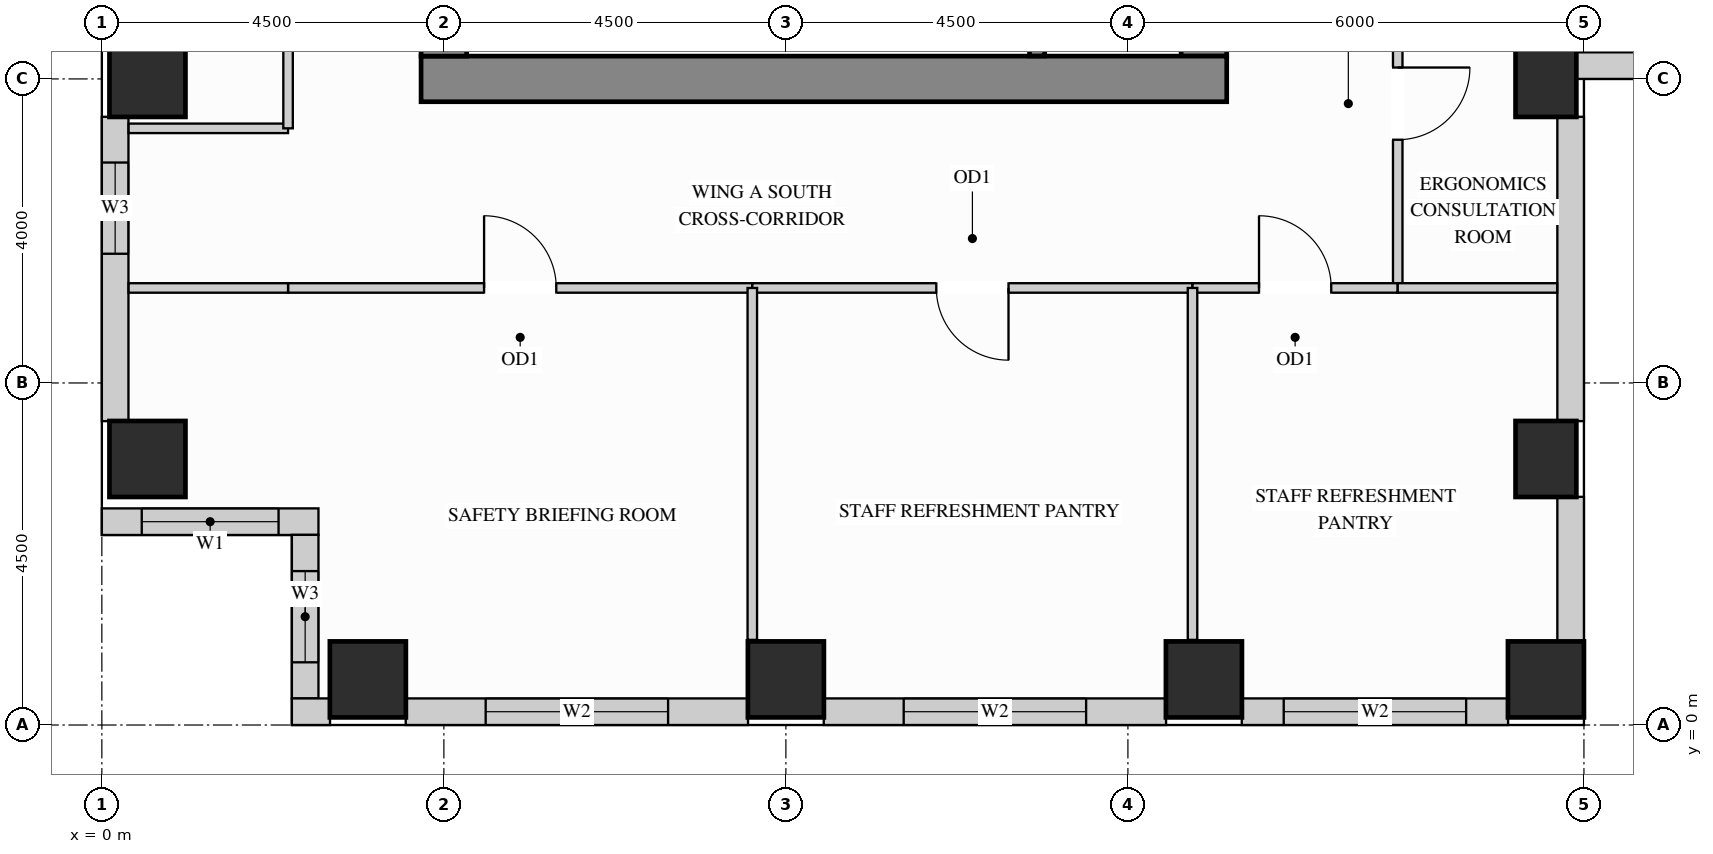
"""IFC4 building model, lengths in metres.
Left out: names, types, materials, properties, quantities, classifications, styles, units other than length and angle.
Written with IfcOpenShell. Run it as: python <this file> out.ifc"""

import sys

from ifc_helpers import new_model, si_unit, direction, frame, frame_2d, origin, origin_2d, place, context, subcontext, project, spatial, rectangle, extrude, source, transform, mapped, element, fill, save


model = new_model("IFC4")
c1 = context("Model", 3, precision=1e-05, world=origin(), true_north=direction((0.0, 1.0)))
c2 = subcontext(c1, "Body", "Model", "MODEL_VIEW")
j1 = project(units=[si_unit("LENGTHUNIT", "METRE"), si_unit("PLANEANGLEUNIT", "RADIAN")], contexts=[c1])
p1 = place(None, origin())
s1 = spatial("IfcSite", under=j1, at=p1, CompositionType="ELEMENT")
p2 = place(p1, origin())
s2 = spatial("IfcBuilding", under=s1, at=p2, CompositionType="ELEMENT")
p3 = place(p2, frame((0.0, 0.0, 157.5)))
s3 = spatial("IfcBuildingStorey", under=s2, at=p3, CompositionType="ELEMENT", Elevation=157.5)
m1 = source(origin(), c2, "Body", "SweptSolid", [
    extrude(rectangle(XDim=0.8, YDim=1.0, at=origin_2d()), origin(), (0.0, 0.0, 1.0), 3.4),
])
for number, where, z_axis, x_axis in (
    (1, (19.0, 3.5, 0.0), (0.0, 0.0, 1.0), (1.0, 0.0, 0.0)),
    (2, (19.0, 8.5, 0.0), (0.0, 0.0, 1.0), (1.0, 0.0, 0.0)),
):
    element("IfcColumn", number, at=place(p3, frame(where, z_axis=z_axis, x_axis=x_axis)), inside=s3, PredefinedType="COLUMN", context=c2, shape_type="MappedRepresentation", body=[
        mapped(m1, transform((0.0, 0.0, 0.0), x_axis=(1.0, 0.0, 0.0), y_axis=(0.0, 1.0, 0.0), z_axis=(0.0, 0.0, 1.0))),
    ])
m2 = source(origin(), c2, "Body", "SweptSolid", [
    extrude(rectangle(XDim=1.0, YDim=1.0, at=origin_2d()), origin(), (0.0, 0.0, 1.0), 3.4),
])
for number, where, z_axis, x_axis in (
    (3, (14.5, 0.6, 0.0), (0.0, 0.0, 1.0), (1.0, 0.0, 0.0)),
    (4, (19.0, 0.6, 0.0), (0.0, 0.0, 1.0), (1.0, 0.0, 0.0)),
    (5, (3.5, 0.6, 0.0), (0.0, 0.0, 1.0), (1.0, 0.0, 0.0)),
    (6, (9.0, 0.6, 0.0), (0.0, 0.0, 1.0), (1.0, 0.0, 0.0)),
    (7, (0.6, 3.5, 0.0), (0.0, 0.0, 1.0), (1.0, 0.0, 0.0)),
    (8, (0.6, 8.5, 0.0), (0.0, 0.0, 1.0), (1.0, 0.0, 0.0)),
):
    element("IfcColumn", number, at=place(p3, frame(where, z_axis=z_axis, x_axis=x_axis)), inside=s3, PredefinedType="COLUMN", context=c2, shape_type="MappedRepresentation", body=[
        mapped(m2, transform((0.0, 0.0, 0.0), x_axis=(1.0, 0.0, 0.0), y_axis=(0.0, 1.0, 0.0), z_axis=(0.0, 0.0, 1.0))),
    ])
m3 = source(origin(), c2, "Body", "SweptSolid", [
    extrude(rectangle(XDim=10.02, YDim=0.6, at=frame_2d((5.01, 0.0))), origin(), (0.0, 0.0, 1.0), 3.4),
])
p4 = place(p3, frame((14.5, 8.8, 0.0), z_axis=(0.0, 0.0, 1.0), x_axis=(0.0, 1.0, 0.0)))
e9 = element("IfcWall", 9, at=p4, inside=s3, PredefinedType="SHEAR", context=c2, shape_type="MappedRepresentation", body=[
    mapped(m3, transform((0.0, 0.0, 0.0), x_axis=(1.0, 0.0, 0.0), y_axis=(0.0, 1.0, 0.0), z_axis=(0.0, 0.0, 1.0))),
])
m4 = source(origin(), c2, "Body", "SweptSolid", [
    extrude(rectangle(XDim=10.6, YDim=0.6, at=frame_2d((5.3, 0.0))), origin(), (0.0, 0.0, 1.0), 3.4),
])
p5 = place(p3, frame((4.2, 8.5, 0.0), z_axis=(0.0, 0.0, 1.0), x_axis=(1.0, 0.0, 0.0)))
e10 = element("IfcWall", 10, at=p5, inside=s3, PredefinedType="SHEAR", context=c2, shape_type="MappedRepresentation", body=[
    mapped(m4, transform((0.0, 0.0, 0.0), x_axis=(1.0, 0.0, 0.0), y_axis=(0.0, 1.0, 0.0), z_axis=(0.0, 0.0, 1.0))),
])
m5 = source(origin(), c2, "Body", "SweptSolid", [
    extrude(rectangle(XDim=20.4, YDim=0.6, at=frame_2d((10.2, 0.0))), origin(), (0.0, 0.0, 1.0), 3.4),
])
p6 = place(p3, frame((4.5, 8.8, 0.0), z_axis=(0.0, 0.0, 1.0), x_axis=(0.0, 1.0, 0.0)))
e11 = element("IfcWall", 11, at=p6, inside=s3, PredefinedType="SHEAR", context=c2, shape_type="MappedRepresentation", body=[
    mapped(m5, transform((0.0, 0.0, 0.0), x_axis=(1.0, 0.0, 0.0), y_axis=(0.0, 1.0, 0.0), z_axis=(0.0, 0.0, 1.0))),
])
p7 = place(p3, frame((0.175, 8.002, 0.0), z_axis=(0.0, 0.0, 1.0), x_axis=(0.0, -1.0, 0.0)))
e12 = element("IfcWall", 12, at=p7, inside=s3, PredefinedType="SOLIDWALL", context=c2, shape_type="SweptSolid", body=[
    extrude(rectangle(XDim=4.004, YDim=0.35, at=frame_2d((2.002, 0.0))), origin(), (0.0, 0.0, 1.0), 2.612),
])
p8 = place(p7, frame((0.602, 0.0, 0.78)))
e13 = element("IfcOpeningElement", 13, at=p8, cuts=e12, PredefinedType="OPENING", context=c2, shape_type="SweptSolid", body=[
    extrude(rectangle(XDim=1.2, YDim=1.652, at=frame_2d((0.6, 0.826))), frame((0.0, 0.185, 0.0), z_axis=(0.0, -1.0, 0.0), x_axis=(1.0, 0.0, 0.0)), (0.0, 0.0, 1.0), 0.37),
])
p9 = place(p3, frame((0.0, 2.675, 0.0), z_axis=(0.0, 0.0, 1.0), x_axis=(1.0, 0.0, 0.0)))
e14 = element("IfcWall", 14, at=p9, inside=s3, PredefinedType="SOLIDWALL", context=c2, shape_type="SweptSolid", body=[
    extrude(rectangle(XDim=2.85, YDim=0.35, at=frame_2d((1.425, 0.0))), origin(), (0.0, 0.0, 1.0), 3.385),
])
p10 = place(p9, frame((0.525, 0.0, 0.78)))
e15 = element("IfcOpeningElement", 15, at=p10, cuts=e14, PredefinedType="OPENING", context=c2, shape_type="SweptSolid", body=[
    extrude(rectangle(XDim=1.8, YDim=2.1, at=frame_2d((0.9, 1.05))), frame((0.0, 0.185, 0.0), z_axis=(0.0, -1.0, 0.0), x_axis=(1.0, 0.0, 0.0)), (0.0, 0.0, 1.0), 0.37),
])
p11 = place(p3, frame((2.675, 2.502, 0.0), z_axis=(0.0, 0.0, 1.0), x_axis=(0.0, -1.0, 0.0)))
e16 = element("IfcWall", 16, at=p11, inside=s3, PredefinedType="SOLIDWALL", context=c2, shape_type="SweptSolid", body=[
    extrude(rectangle(XDim=2.154, YDim=0.35, at=frame_2d((1.077, 0.0))), origin(), (0.0, 0.0, 1.0), 3.385),
])
p12 = place(p11, frame((0.477, 0.0, 0.78)))
e17 = element("IfcOpeningElement", 17, at=p12, cuts=e16, PredefinedType="OPENING", context=c2, shape_type="SweptSolid", body=[
    extrude(rectangle(XDim=1.2, YDim=2.1, at=frame_2d((0.6, 1.05))), frame((0.0, 0.185, 0.0), z_axis=(0.0, -1.0, 0.0), x_axis=(1.0, 0.0, 0.0)), (0.0, 0.0, 1.0), 0.37),
])
m6 = source(origin(), c2, "Body", "SweptSolid", [
    extrude(rectangle(XDim=0.502, YDim=0.35, at=frame_2d((0.251, 0.0))), origin(), (0.0, 0.0, 1.0), 3.385),
])
p13 = place(p3, frame((2.5, 0.175, 0.0), z_axis=(0.0, 0.0, 1.0), x_axis=(1.0, 0.0, 0.0)))
e18 = element("IfcWall", 18, at=p13, inside=s3, PredefinedType="SOLIDWALL", context=c2, shape_type="MappedRepresentation", body=[
    mapped(m6, transform((0.0, 0.0, 0.0), x_axis=(1.0, 0.0, 0.0), y_axis=(0.0, 1.0, 0.0), z_axis=(0.0, 0.0, 1.0))),
])
p14 = place(p3, frame((3.998, 0.175, 0.0), z_axis=(0.0, 0.0, 1.0), x_axis=(1.0, 0.0, 0.0)))
e19 = element("IfcWall", 19, at=p14, inside=s3, PredefinedType="SOLIDWALL", context=c2, shape_type="SweptSolid", body=[
    extrude(rectangle(XDim=4.504, YDim=0.35, at=frame_2d((2.252, 0.0))), origin(), (0.0, 0.0, 1.0), 2.612),
])
p15 = place(p14, frame((1.052, 0.0, 0.78)))
e20 = element("IfcOpeningElement", 20, at=p15, cuts=e19, PredefinedType="OPENING", context=c2, shape_type="SweptSolid", body=[
    extrude(rectangle(XDim=2.4, YDim=1.652, at=frame_2d((1.2, 0.826))), frame((0.0, 0.185, 0.0), z_axis=(0.0, -1.0, 0.0), x_axis=(1.0, 0.0, 0.0)), (0.0, 0.0, 1.0), 0.37),
])
p16 = place(p3, frame((9.498, 0.175, 0.0), z_axis=(0.0, 0.0, 1.0), x_axis=(1.0, 0.0, 0.0)))
e21 = element("IfcWall", 21, at=p16, inside=s3, PredefinedType="SOLIDWALL", context=c2, shape_type="SweptSolid", body=[
    extrude(rectangle(XDim=4.504, YDim=0.35, at=frame_2d((2.252, 0.0))), origin(), (0.0, 0.0, 1.0), 2.612),
])
p17 = place(p16, frame((1.052, 0.0, 0.78)))
e22 = element("IfcOpeningElement", 22, at=p17, cuts=e21, PredefinedType="OPENING", context=c2, shape_type="SweptSolid", body=[
    extrude(rectangle(XDim=2.4, YDim=1.652, at=frame_2d((1.2, 0.826))), frame((0.0, 0.185, 0.0), z_axis=(0.0, -1.0, 0.0), x_axis=(1.0, 0.0, 0.0)), (0.0, 0.0, 1.0), 0.37),
])
p18 = place(p3, frame((14.998, 0.175, 0.0), z_axis=(0.0, 0.0, 1.0), x_axis=(1.0, 0.0, 0.0)))
e23 = element("IfcWall", 23, at=p18, inside=s3, PredefinedType="SOLIDWALL", context=c2, shape_type="SweptSolid", body=[
    extrude(rectangle(XDim=3.504, YDim=0.35, at=frame_2d((1.752, 0.0))), origin(), (0.0, 0.0, 1.0), 2.612),
])
p19 = place(p18, frame((0.552, 0.0, 0.78)))
e24 = element("IfcOpeningElement", 24, at=p19, cuts=e23, PredefinedType="OPENING", context=c2, shape_type="SweptSolid", body=[
    extrude(rectangle(XDim=2.4, YDim=1.652, at=frame_2d((1.2, 0.826))), frame((0.0, 0.185, 0.0), z_axis=(0.0, -1.0, 0.0), x_axis=(1.0, 0.0, 0.0)), (0.0, 0.0, 1.0), 0.37),
])
m7 = source(origin(), c2, "Body", "SweptSolid", [
    extrude(rectangle(XDim=1.904, YDim=0.35, at=frame_2d((0.952, 0.0))), origin(), (0.0, 0.0, 1.0), 2.612),
])
p20 = place(p3, frame((19.325, 1.098, 0.0), z_axis=(0.0, 0.0, 1.0), x_axis=(0.0, 1.0, 0.0)))
e25 = element("IfcWall", 25, at=p20, inside=s3, PredefinedType="SOLIDWALL", context=c2, shape_type="MappedRepresentation", body=[
    mapped(m7, transform((0.0, 0.0, 0.0), x_axis=(1.0, 0.0, 0.0), y_axis=(0.0, 1.0, 0.0), z_axis=(0.0, 0.0, 1.0))),
])
m8 = source(origin(), c2, "Body", "SweptSolid", [
    extrude(rectangle(XDim=4.004, YDim=0.35, at=frame_2d((2.002, 0.0))), origin(), (0.0, 0.0, 1.0), 2.612),
])
p21 = place(p3, frame((19.325, 3.998, 0.0), z_axis=(0.0, 0.0, 1.0), x_axis=(0.0, 1.0, 0.0)))
e26 = element("IfcWall", 26, at=p21, inside=s3, PredefinedType="SOLIDWALL", context=c2, shape_type="MappedRepresentation", body=[
    mapped(m8, transform((0.0, 0.0, 0.0), x_axis=(1.0, 0.0, 0.0), y_axis=(0.0, 1.0, 0.0), z_axis=(0.0, 0.0, 1.0))),
])
p22 = place(p3, frame((19.398, 8.675, 0.0), z_axis=(0.0, 0.0, 1.0), x_axis=(1.0, 0.0, 0.0)))
e27 = element("IfcWall", 27, at=p22, inside=s3, PredefinedType="SOLIDWALL", context=c2, shape_type="SweptSolid", body=[
    extrude(rectangle(XDim=3.604, YDim=0.35, at=frame_2d((1.802, 0.0))), origin(), (0.0, 0.0, 1.0), 3.385),
])
p23 = place(p22, frame((1.067, 0.0, 0.78)))
e28 = element("IfcOpeningElement", 28, at=p23, cuts=e27, PredefinedType="OPENING", context=c2, shape_type="SweptSolid", body=[
    extrude(rectangle(XDim=1.5, YDim=2.0, at=frame_2d((0.75, 1.0))), frame((0.0, 0.185, 0.0), z_axis=(0.0, -1.0, 0.0), x_axis=(1.0, 0.0, 0.0)), (0.0, 0.0, 1.0), 0.37),
])
p24 = place(p3, frame((17.05, 5.75, 0.0), z_axis=(0.0, 0.0, 1.0), x_axis=(0.0, 1.0, 0.0)))
e29 = element("IfcWall", 29, at=p24, inside=s3, PredefinedType="PARTITIONING", context=c2, shape_type="SweptSolid", body=[
    extrude(rectangle(XDim=4.85, YDim=0.125, at=frame_2d((2.425, 0.0))), origin(), (0.0, 0.0, 1.0), 3.385),
])
p25 = place(p24, frame((1.95, 0.0, 0.0)))
e30 = element("IfcOpeningElement", 30, at=p25, cuts=e29, PredefinedType="OPENING", context=c2, shape_type="SweptSolid", body=[
    extrude(rectangle(XDim=0.95, YDim=2.15, at=frame_2d((0.475, 1.075))), frame((0.0, 0.073, 0.0), z_axis=(0.0, -1.0, 0.0), x_axis=(1.0, 0.0, 0.0)), (0.0, 0.0, 1.0), 0.145),
])
m9 = source(origin(), c2, "Body", "SweptSolid", [
    extrude(rectangle(XDim=2.098, YDim=0.125, at=frame_2d((1.049, 0.0))), origin(), (0.0, 0.0, 1.0), 3.385),
])
p26 = place(p3, frame((0.352, 7.85, 0.0), z_axis=(0.0, 0.0, 1.0), x_axis=(1.0, 0.0, 0.0)))
e31 = element("IfcWall", 31, at=p26, inside=s3, PredefinedType="PARTITIONING", context=c2, shape_type="MappedRepresentation", body=[
    mapped(m9, transform((0.0, 0.0, 0.0), x_axis=(1.0, 0.0, 0.0), y_axis=(0.0, 1.0, 0.0), z_axis=(0.0, 0.0, 1.0))),
])
p27 = place(p3, frame((2.45, 5.75, 0.0), z_axis=(0.0, 0.0, 1.0), x_axis=(1.0, 0.0, 0.0)))
e32 = element("IfcWall", 32, at=p27, inside=s3, PredefinedType="PARTITIONING", context=c2, shape_type="SweptSolid", body=[
    extrude(rectangle(XDim=6.108, YDim=0.125, at=frame_2d((3.054, 0.0))), origin(), (0.0, 0.0, 1.0), 3.385),
])
p28 = place(p27, frame((2.579, 0.0, 0.0)))
e33 = element("IfcOpeningElement", 33, at=p28, cuts=e32, PredefinedType="OPENING", context=c2, shape_type="SweptSolid", body=[
    extrude(rectangle(XDim=0.95, YDim=2.15, at=frame_2d((0.475, 1.075))), frame((0.0, 0.073, 0.0), z_axis=(0.0, -1.0, 0.0), x_axis=(1.0, 0.0, 0.0)), (0.0, 0.0, 1.0), 0.145),
])
p29 = place(p3, frame((8.558, 5.75, 0.0), z_axis=(0.0, 0.0, 1.0), x_axis=(1.0, 0.0, 0.0)))
e34 = element("IfcWall", 34, at=p29, inside=s3, PredefinedType="PARTITIONING", context=c2, shape_type="SweptSolid", body=[
    extrude(rectangle(XDim=5.792, YDim=0.125, at=frame_2d((2.896, 0.0))), origin(), (0.0, 0.0, 1.0), 3.385),
])
p30 = place(p29, frame((2.421, 0.0, 0.0)))
e35 = element("IfcOpeningElement", 35, at=p30, cuts=e34, PredefinedType="OPENING", context=c2, shape_type="SweptSolid", body=[
    extrude(rectangle(XDim=0.95, YDim=2.15, at=frame_2d((0.475, 1.075))), frame((0.0, 0.073, 0.0), z_axis=(0.0, -1.0, 0.0), x_axis=(1.0, 0.0, 0.0)), (0.0, 0.0, 1.0), 0.145),
])
p31 = place(p3, frame((14.35, 5.75, 0.0), z_axis=(0.0, 0.0, 1.0), x_axis=(1.0, 0.0, 0.0)))
e36 = element("IfcWall", 36, at=p31, inside=s3, PredefinedType="PARTITIONING", context=c2, shape_type="SweptSolid", body=[
    extrude(rectangle(XDim=2.7, YDim=0.125, at=frame_2d((1.35, 0.0))), origin(), (0.0, 0.0, 1.0), 3.385),
])
p32 = place(p31, frame((0.875, 0.0, 0.0)))
e37 = element("IfcOpeningElement", 37, at=p32, cuts=e36, PredefinedType="OPENING", context=c2, shape_type="SweptSolid", body=[
    extrude(rectangle(XDim=0.95, YDim=2.15, at=frame_2d((0.475, 1.075))), frame((0.0, 0.073, 0.0), z_axis=(0.0, -1.0, 0.0), x_axis=(1.0, 0.0, 0.0)), (0.0, 0.0, 1.0), 0.145),
])
for number, where, z_axis, x_axis in (
    (38, (0.352, 5.75, 0.0), (0.0, 0.0, 1.0), (1.0, 0.0, 0.0)),
    (39, (17.05, 5.75, 0.0), (0.0, 0.0, 1.0), (1.0, 0.0, 0.0)),
):
    element("IfcWall", number, at=place(p3, frame(where, z_axis=z_axis, x_axis=x_axis)), inside=s3, PredefinedType="PARTITIONING", context=c2, shape_type="MappedRepresentation", body=[
        mapped(m9, transform((0.0, 0.0, 0.0), x_axis=(1.0, 0.0, 0.0), y_axis=(0.0, 1.0, 0.0), z_axis=(0.0, 0.0, 1.0))),
    ])
m10 = source(origin(), c2, "Body", "SweptSolid", [
    extrude(rectangle(XDim=4.63, YDim=0.125, at=frame_2d((2.315, 0.0))), origin(), (0.0, 0.0, 1.0), 3.385),
])
for number, where, z_axis, x_axis in (
    (40, (8.558, 1.12, 0.0), (0.0, 0.0, 1.0), (0.0, 1.0, 0.0)),
    (41, (14.35, 1.12, 0.0), (0.0, 0.0, 1.0), (0.0, 1.0, 0.0)),
):
    element("IfcWall", number, at=place(p3, frame(where, z_axis=z_axis, x_axis=x_axis)), inside=s3, PredefinedType="PARTITIONING", context=c2, shape_type="MappedRepresentation", body=[
        mapped(m10, transform((0.0, 0.0, 0.0), x_axis=(1.0, 0.0, 0.0), y_axis=(0.0, 1.0, 0.0), z_axis=(0.0, 0.0, 1.0))),
    ])
p33 = place(p3, frame((2.45, 7.85, 0.0), z_axis=(0.0, 0.0, 1.0), x_axis=(0.0, 1.0, 0.0)))
e42 = element("IfcWall", 42, at=p33, inside=s3, PredefinedType="PARTITIONING", context=c2, shape_type="SweptSolid", body=[
    extrude(rectangle(XDim=7.25, YDim=0.125, at=frame_2d((3.625, 0.0))), origin(), (0.0, 0.0, 1.0), 3.385),
])
p34 = place(p33, frame((3.15, 0.0, 0.0)))
e43 = element("IfcOpeningElement", 43, at=p34, cuts=e42, PredefinedType="OPENING", context=c2, shape_type="SweptSolid", body=[
    extrude(rectangle(XDim=0.95, YDim=2.15, at=frame_2d((0.475, 1.075))), frame((0.0, 0.073, 0.0), z_axis=(0.0, -1.0, 0.0), x_axis=(1.0, 0.0, 0.0)), (0.0, 0.0, 1.0), 0.145),
])
m11 = source(origin(), c2, "Body", "SweptSolid", [
    extrude(rectangle(XDim=3.753, YDim=0.2, at=frame_2d((1.876, 0.0))), origin(), (0.0, 0.0, 1.0), 3.4),
])
p35 = place(p3, frame((12.305, 8.802, 0.0), z_axis=(0.0, 0.0, 1.0), x_axis=(0.0, 1.0, 0.0)))
e44 = element("IfcWall", 44, at=p35, inside=s3, PredefinedType="SHEAR", context=c2, shape_type="MappedRepresentation", body=[
    mapped(m11, transform((0.0, 0.0, 0.0), x_axis=(1.0, 0.0, 0.0), y_axis=(0.0, 1.0, 0.0), z_axis=(0.0, 0.0, 1.0))),
])
m12 = source(origin(), c2, "Body", "SweptSolid", [
    extrude(rectangle(XDim=0.95, YDim=2.15, at=frame_2d((0.475, 1.075))), frame((0.0, 0.025, 0.0), z_axis=(0.0, -1.0, 0.0), x_axis=(1.0, 0.0, 0.0)), (0.0, 0.0, 1.0), 0.05),
])
p36 = place(p25, origin())
e45 = element("IfcDoor", 45, at=p36, inside=s3, OperationType="SINGLE_SWING_RIGHT", PredefinedType="DOOR", context=c2, shape_type="MappedRepresentation", body=[
    mapped(m12, transform((0.0, 0.0, 0.0), x_axis=(1.0, 0.0, 0.0), y_axis=(0.0, 1.0, 0.0), z_axis=(0.0, 0.0, 1.0))),
])
fill(e30, e45)
p37 = place(p28, origin())
e46 = element("IfcDoor", 46, at=p37, inside=s3, OperationType="SINGLE_SWING_LEFT", PredefinedType="DOOR", context=c2, shape_type="MappedRepresentation", body=[
    mapped(m12, transform((0.0, 0.0, 0.0), x_axis=(1.0, 0.0, 0.0), y_axis=(0.0, 1.0, 0.0), z_axis=(0.0, 0.0, 1.0))),
])
fill(e33, e46)
p38 = place(p30, origin())
e47 = element("IfcDoor", 47, at=p38, inside=s3, OperationType="SINGLE_SWING_RIGHT", PredefinedType="DOOR", context=c2, shape_type="MappedRepresentation", body=[
    mapped(m12, transform((0.0, 0.0, 0.0), x_axis=(1.0, 0.0, 0.0), y_axis=(0.0, 1.0, 0.0), z_axis=(0.0, 0.0, 1.0))),
])
fill(e35, e47)
p39 = place(p32, origin())
e48 = element("IfcDoor", 48, at=p39, inside=s3, OperationType="SINGLE_SWING_LEFT", PredefinedType="DOOR", context=c2, shape_type="MappedRepresentation", body=[
    mapped(m12, transform((0.0, 0.0, 0.0), x_axis=(1.0, 0.0, 0.0), y_axis=(0.0, 1.0, 0.0), z_axis=(0.0, 0.0, 1.0))),
])
fill(e37, e48)
m13 = source(origin(), c2, "Body", "SweptSolid", [
    extrude(rectangle(XDim=1.8, YDim=2.1, at=frame_2d((0.9, 1.05))), frame((0.0, 0.03, 0.0), z_axis=(0.0, -1.0, 0.0), x_axis=(1.0, 0.0, 0.0)), (0.0, 0.0, 1.0), 0.06),
])
p40 = place(p10, origin())
e49 = element("IfcWindow", 49, at=p40, inside=s3, PartitioningType="SINGLE_PANEL", PredefinedType="WINDOW", context=c2, shape_type="MappedRepresentation", body=[
    mapped(m13, transform((0.0, 0.0, 0.0), x_axis=(1.0, 0.0, 0.0), y_axis=(0.0, 1.0, 0.0), z_axis=(0.0, 0.0, 1.0))),
])
fill(e15, e49)
m14 = source(origin(), c2, "Body", "SweptSolid", [
    extrude(rectangle(XDim=2.4, YDim=1.652, at=frame_2d((1.2, 0.826))), frame((0.0, 0.03, 0.0), z_axis=(0.0, -1.0, 0.0), x_axis=(1.0, 0.0, 0.0)), (0.0, 0.0, 1.0), 0.06),
])
p41 = place(p15, origin())
e50 = element("IfcWindow", 50, at=p41, inside=s3, PartitioningType="SINGLE_PANEL", PredefinedType="WINDOW", context=c2, shape_type="MappedRepresentation", body=[
    mapped(m14, transform((0.0, 0.0, 0.0), x_axis=(1.0, 0.0, 0.0), y_axis=(0.0, 1.0, 0.0), z_axis=(0.0, 0.0, 1.0))),
])
fill(e20, e50)
p42 = place(p17, origin())
e51 = element("IfcWindow", 51, at=p42, inside=s3, PartitioningType="SINGLE_PANEL", PredefinedType="WINDOW", context=c2, shape_type="MappedRepresentation", body=[
    mapped(m14, transform((0.0, 0.0, 0.0), x_axis=(1.0, 0.0, 0.0), y_axis=(0.0, 1.0, 0.0), z_axis=(0.0, 0.0, 1.0))),
])
fill(e22, e51)
p43 = place(p19, origin())
e52 = element("IfcWindow", 52, at=p43, inside=s3, PartitioningType="SINGLE_PANEL", PredefinedType="WINDOW", context=c2, shape_type="MappedRepresentation", body=[
    mapped(m14, transform((0.0, 0.0, 0.0), x_axis=(1.0, 0.0, 0.0), y_axis=(0.0, 1.0, 0.0), z_axis=(0.0, 0.0, 1.0))),
])
fill(e24, e52)
m15 = source(origin(), c2, "Body", "SweptSolid", [
    extrude(rectangle(XDim=1.2, YDim=1.652, at=frame_2d((0.6, 0.826))), frame((0.0, 0.03, 0.0), z_axis=(0.0, -1.0, 0.0), x_axis=(1.0, 0.0, 0.0)), (0.0, 0.0, 1.0), 0.06),
])
p44 = place(p8, origin())
e53 = element("IfcWindow", 53, at=p44, inside=s3, PartitioningType="SINGLE_PANEL", PredefinedType="WINDOW", context=c2, shape_type="MappedRepresentation", body=[
    mapped(m15, transform((0.0, 0.0, 0.0), x_axis=(1.0, 0.0, 0.0), y_axis=(0.0, 1.0, 0.0), z_axis=(0.0, 0.0, 1.0))),
])
fill(e13, e53)
m16 = source(origin(), c2, "Body", "SweptSolid", [
    extrude(rectangle(XDim=1.2, YDim=2.1, at=frame_2d((0.6, 1.05))), frame((0.0, 0.03, 0.0), z_axis=(0.0, -1.0, 0.0), x_axis=(1.0, 0.0, 0.0)), (0.0, 0.0, 1.0), 0.06),
])
p45 = place(p12, origin())
e54 = element("IfcWindow", 54, at=p45, inside=s3, PartitioningType="SINGLE_PANEL", PredefinedType="WINDOW", context=c2, shape_type="MappedRepresentation", body=[
    mapped(m16, transform((0.0, 0.0, 0.0), x_axis=(1.0, 0.0, 0.0), y_axis=(0.0, 1.0, 0.0), z_axis=(0.0, 0.0, 1.0))),
])
fill(e17, e54)
save(model, sys.argv[1])
